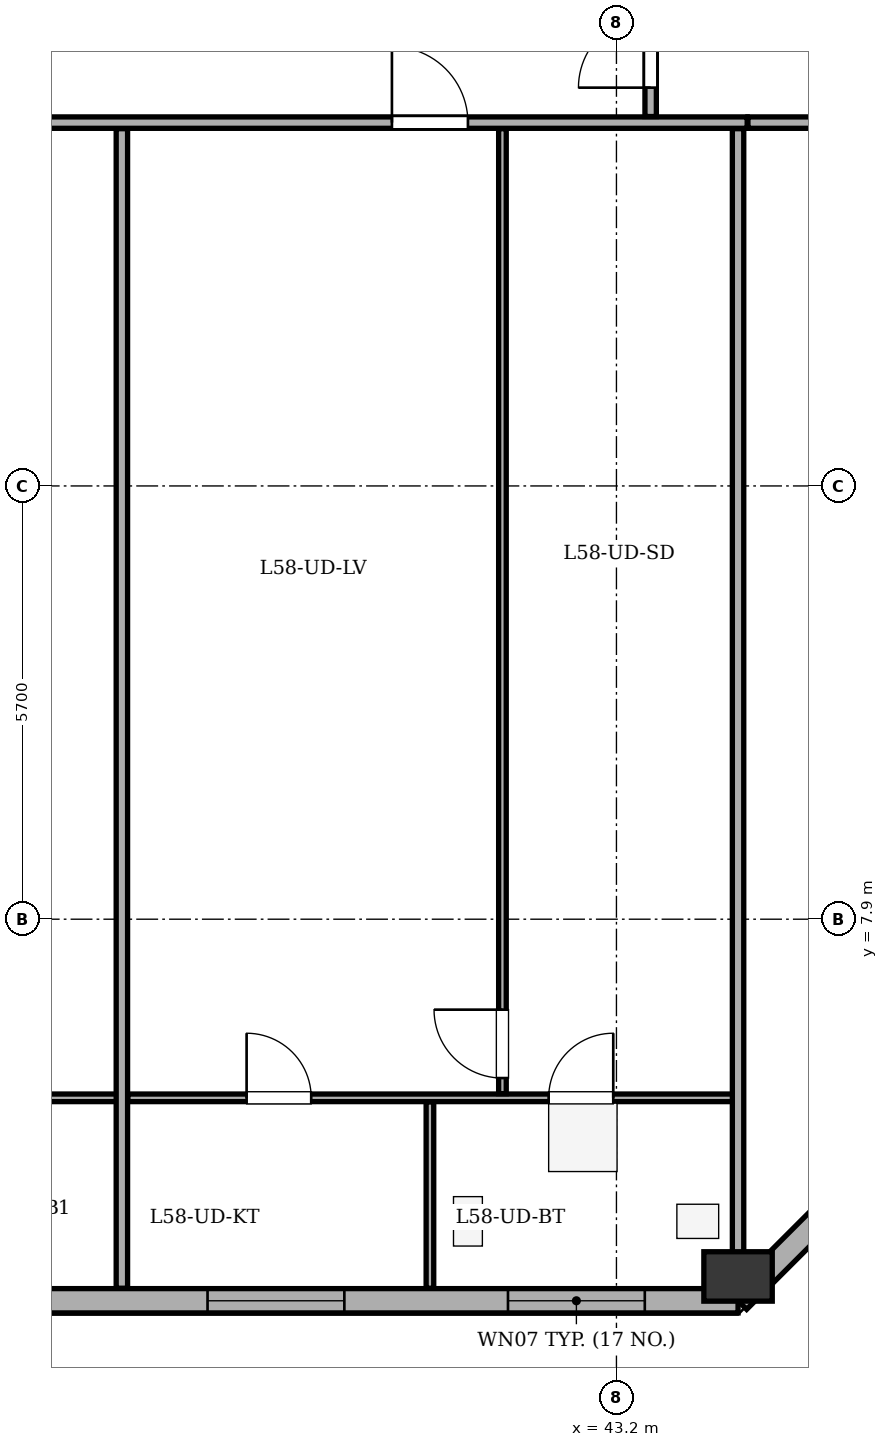
"""IFC4 building model, lengths in metres.
Left out: names, types, materials, properties, quantities, classifications, styles, units other than length and angle.
Written with IfcOpenShell. Run it as: python <this file> out.ifc"""

import sys

from ifc_helpers import new_model, si_unit, direction, frame, frame_2d, origin, origin_2d, place, context, subcontext, project, spatial, rectangle, extrude, element, fill, save


model = new_model("IFC4")
c1 = context("Model", 3, precision=1e-05, world=origin(), true_north=direction((0.0, 1.0)))
c2 = subcontext(c1, "Body", "Model", "MODEL_VIEW")
j1 = project(units=[si_unit("LENGTHUNIT", "METRE"), si_unit("PLANEANGLEUNIT", "RADIAN")], contexts=[c1])
p1 = place(None, origin())
s1 = spatial("IfcSite", under=j1, at=p1, CompositionType="ELEMENT")
p2 = place(p1, origin())
s2 = spatial("IfcBuilding", under=s1, at=p2, CompositionType="ELEMENT")
p3 = place(p2, frame((0.0, 0.0, 224.5)))
s3 = spatial("IfcBuildingStorey", under=s2, at=p3, CompositionType="ELEMENT", Elevation=224.5)
p4 = place(p3, frame((44.8, 3.2, 0.0), z_axis=(0.0, 0.0, 1.0), x_axis=(1.0, 0.0, 0.0)))
e1 = element("IfcColumn", 1, at=p4, inside=s3, PredefinedType="COLUMN", context=c2, shape_type="SweptSolid", body=[
    extrude(rectangle(XDim=0.65, YDim=0.9, at=origin_2d()), origin(), (0.0, 0.0, 1.0), 3.4),
])
p5 = place(p3, frame((44.8, 2.88, 0.0), z_axis=(0.0, 0.0, 1.0), x_axis=(-1.0, 0.0, 0.0)))
e2 = element("IfcWall", 2, at=p5, inside=s3, PredefinedType="STANDARD", context=c2, shape_type="SweptSolid", body=[
    extrude(rectangle(XDim=36.0, YDim=0.32, at=frame_2d((18.0, 0.0))), origin(), (0.0, 0.0, 1.0), 2.335),
])
p6 = place(p5, frame((20.1, 0.0, 0.0)))
e3 = element("IfcOpeningElement", 3, at=p6, cuts=e2, PredefinedType="OPENING", context=c2, shape_type="SweptSolid", body=[
    extrude(rectangle(XDim=1.0, YDim=2.02, at=frame_2d((0.5, 1.01))), frame((0.0, 0.17, 0.0), z_axis=(0.0, -1.0, 0.0), x_axis=(1.0, 0.0, 0.0)), (0.0, 0.0, 1.0), 0.34),
])
p7 = place(p5, frame((1.227, 0.0, 0.75)))
e4 = element("IfcOpeningElement", 4, at=p7, cuts=e2, PredefinedType="OPENING", context=c2, shape_type="SweptSolid", body=[
    extrude(rectangle(XDim=1.8, YDim=1.465, at=frame_2d((0.9, 0.732))), frame((0.0, 0.17, 0.0), z_axis=(0.0, -1.0, 0.0), x_axis=(1.0, 0.0, 0.0)), (0.0, 0.0, 1.0), 0.34),
])
p8 = place(p5, frame((5.18, 0.0, 0.75)))
e5 = element("IfcOpeningElement", 5, at=p8, cuts=e2, PredefinedType="OPENING", context=c2, shape_type="SweptSolid", body=[
    extrude(rectangle(XDim=1.8, YDim=1.465, at=frame_2d((0.9, 0.732))), frame((0.0, 0.17, 0.0), z_axis=(0.0, -1.0, 0.0), x_axis=(1.0, 0.0, 0.0)), (0.0, 0.0, 1.0), 0.34),
])
p9 = place(p5, frame((12.548, 0.0, 0.75)))
e6 = element("IfcOpeningElement", 6, at=p9, cuts=e2, PredefinedType="OPENING", context=c2, shape_type="SweptSolid", body=[
    extrude(rectangle(XDim=1.25, YDim=1.465, at=frame_2d((0.625, 0.732))), frame((0.0, 0.17, 0.0), z_axis=(0.0, -1.0, 0.0), x_axis=(1.0, 0.0, 0.0)), (0.0, 0.0, 1.0), 0.34),
])
p10 = place(p5, frame((26.587, 0.0, 0.75)))
e7 = element("IfcOpeningElement", 7, at=p10, cuts=e2, PredefinedType="OPENING", context=c2, shape_type="SweptSolid", body=[
    extrude(rectangle(XDim=1.8, YDim=1.465, at=frame_2d((0.9, 0.732))), frame((0.0, 0.17, 0.0), z_axis=(0.0, -1.0, 0.0), x_axis=(1.0, 0.0, 0.0)), (0.0, 0.0, 1.0), 0.34),
])
p11 = place(p5, frame((30.94, 0.0, 0.75)))
e8 = element("IfcOpeningElement", 8, at=p11, cuts=e2, PredefinedType="OPENING", context=c2, shape_type="SweptSolid", body=[
    extrude(rectangle(XDim=1.8, YDim=1.465, at=frame_2d((0.9, 0.732))), frame((0.0, 0.17, 0.0), z_axis=(0.0, -1.0, 0.0), x_axis=(1.0, 0.0, 0.0)), (0.0, 0.0, 1.0), 0.34),
])
p12 = place(p5, frame((10.33, 0.0, 0.75)))
e9 = element("IfcOpeningElement", 9, at=p12, cuts=e2, PredefinedType="OPENING", context=c2, shape_type="SweptSolid", body=[
    extrude(rectangle(XDim=0.75, YDim=1.45, at=frame_2d((0.375, 0.725))), frame((0.0, 0.17, 0.0), z_axis=(0.0, -1.0, 0.0), x_axis=(1.0, 0.0, 0.0)), (0.0, 0.0, 1.0), 0.34),
])
p13 = place(p3, frame((49.12, 7.2, 0.0), z_axis=(0.0, 0.0, 1.0), x_axis=(-0.707106781187, -0.707106781187, 0.0)))
e10 = element("IfcWall", 10, at=p13, inside=s3, PredefinedType="STANDARD", context=c2, shape_type="SweptSolid", body=[
    extrude(rectangle(XDim=6.11, YDim=0.32, at=frame_2d((3.055, 0.0))), origin(), (0.0, 0.0, 1.0), 2.335),
])
p14 = place(p13, frame((2.355, 0.0, 0.75)))
e11 = element("IfcOpeningElement", 11, at=p14, cuts=e10, PredefinedType="OPENING", context=c2, shape_type="SweptSolid", body=[
    extrude(rectangle(XDim=1.4, YDim=1.465, at=frame_2d((0.7, 0.732))), frame((0.0, 0.17, 0.0), z_axis=(0.0, -1.0, 0.0), x_axis=(1.0, 0.0, 0.0)), (0.0, 0.0, 1.0), 0.34),
])
p15 = place(p3, frame((10.9, 18.38, 0.0), z_axis=(0.0, 0.0, 1.0), x_axis=(1.0, 0.0, 0.0)))
e12 = element("IfcWall", 12, at=p15, inside=s3, PredefinedType="PARTITIONING", context=c2, shape_type="SweptSolid", body=[
    extrude(rectangle(XDim=34.02, YDim=0.15, at=frame_2d((17.01, 0.0))), origin(), (0.0, 0.0, 1.0), 2.95),
])
p16 = place(p15, frame((2.774, 0.0, 0.0)))
e13 = element("IfcOpeningElement", 13, at=p16, cuts=e12, PredefinedType="OPENING", context=c2, shape_type="SweptSolid", body=[
    extrude(rectangle(XDim=1.0, YDim=2.1, at=frame_2d((0.5, 1.05))), frame((0.0, 0.085, 0.0), z_axis=(0.0, -1.0, 0.0), x_axis=(1.0, 0.0, 0.0)), (0.0, 0.0, 1.0), 0.17),
])
p17 = place(p15, frame((12.118, 0.0, 0.0)))
e14 = element("IfcOpeningElement", 14, at=p17, cuts=e12, PredefinedType="OPENING", context=c2, shape_type="SweptSolid", body=[
    extrude(rectangle(XDim=1.0, YDim=2.1, at=frame_2d((0.5, 1.05))), frame((0.0, 0.085, 0.0), z_axis=(0.0, -1.0, 0.0), x_axis=(1.0, 0.0, 0.0)), (0.0, 0.0, 1.0), 0.17),
])
p18 = place(p15, frame((20.901, 0.0, 0.0)))
e15 = element("IfcOpeningElement", 15, at=p18, cuts=e12, PredefinedType="OPENING", context=c2, shape_type="SweptSolid", body=[
    extrude(rectangle(XDim=1.0, YDim=2.1, at=frame_2d((0.5, 1.05))), frame((0.0, 0.085, 0.0), z_axis=(0.0, -1.0, 0.0), x_axis=(1.0, 0.0, 0.0)), (0.0, 0.0, 1.0), 0.17),
])
p19 = place(p15, frame((29.346, 0.0, 0.0)))
e16 = element("IfcOpeningElement", 16, at=p19, cuts=e12, PredefinedType="OPENING", context=c2, shape_type="SweptSolid", body=[
    extrude(rectangle(XDim=1.0, YDim=2.1, at=frame_2d((0.5, 1.05))), frame((0.0, 0.085, 0.0), z_axis=(0.0, -1.0, 0.0), x_axis=(1.0, 0.0, 0.0)), (0.0, 0.0, 1.0), 0.17),
])
p20 = place(p3, frame((27.99, 5.55, 0.0), z_axis=(0.0, 0.0, 1.0), x_axis=(1.0, 0.0, 0.0)))
e17 = element("IfcWall", 17, at=p20, inside=s3, PredefinedType="PARTITIONING", context=c2, shape_type="SweptSolid", body=[
    extrude(rectangle(XDim=8.743, YDim=0.1, at=frame_2d((4.372, 0.0))), origin(), (0.0, 0.0, 1.0), 2.95),
])
p21 = place(p20, frame((0.625, 0.0, 0.0)))
e18 = element("IfcOpeningElement", 18, at=p21, cuts=e17, PredefinedType="OPENING", context=c2, shape_type="SweptSolid", body=[
    extrude(rectangle(XDim=0.85, YDim=2.05, at=frame_2d((0.425, 1.025))), frame((0.0, 0.06, 0.0), z_axis=(0.0, -1.0, 0.0), x_axis=(1.0, 0.0, 0.0)), (0.0, 0.0, 1.0), 0.12),
])
p22 = place(p20, frame((3.212, 0.0, 0.0)))
e19 = element("IfcOpeningElement", 19, at=p22, cuts=e17, PredefinedType="OPENING", context=c2, shape_type="SweptSolid", body=[
    extrude(rectangle(XDim=0.85, YDim=2.05, at=frame_2d((0.425, 1.025))), frame((0.0, 0.06, 0.0), z_axis=(0.0, -1.0, 0.0), x_axis=(1.0, 0.0, 0.0)), (0.0, 0.0, 1.0), 0.12),
])
p23 = place(p20, frame((6.049, 0.0, 0.0)))
e20 = element("IfcOpeningElement", 20, at=p23, cuts=e17, PredefinedType="OPENING", context=c2, shape_type="SweptSolid", body=[
    extrude(rectangle(XDim=0.9, YDim=2.05, at=frame_2d((0.45, 1.025))), frame((0.0, 0.06, 0.0), z_axis=(0.0, -1.0, 0.0), x_axis=(1.0, 0.0, 0.0)), (0.0, 0.0, 1.0), 0.12),
])
p24 = place(p3, frame((36.693, 3.045, 0.0), z_axis=(0.0, 0.0, 1.0), x_axis=(0.0, 1.0, 0.0)))
e21 = element("IfcWall", 21, at=p24, inside=s3, PredefinedType="PARTITIONING", context=c2, shape_type="SweptSolid", body=[
    extrude(rectangle(XDim=15.255, YDim=0.15, at=frame_2d((7.627, 0.0))), origin(), (0.0, 0.0, 1.0), 2.385),
])
p25 = place(p3, frame((36.773, 5.55, 0.0), z_axis=(0.0, 0.0, 1.0), x_axis=(1.0, 0.0, 0.0)))
e22 = element("IfcWall", 22, at=p25, inside=s3, PredefinedType="PARTITIONING", context=c2, shape_type="SweptSolid", body=[
    extrude(rectangle(XDim=8.067, YDim=0.1, at=frame_2d((4.034, 0.0))), origin(), (0.0, 0.0, 1.0), 2.95),
])
p26 = place(p25, frame((1.561, 0.0, 0.0)))
e23 = element("IfcOpeningElement", 23, at=p26, cuts=e22, PredefinedType="OPENING", context=c2, shape_type="SweptSolid", body=[
    extrude(rectangle(XDim=0.85, YDim=2.05, at=frame_2d((0.425, 1.025))), frame((0.0, 0.06, 0.0), z_axis=(0.0, -1.0, 0.0), x_axis=(1.0, 0.0, 0.0)), (0.0, 0.0, 1.0), 0.12),
])
p27 = place(p25, frame((5.535, 0.0, 0.0)))
e24 = element("IfcOpeningElement", 24, at=p27, cuts=e22, PredefinedType="OPENING", context=c2, shape_type="SweptSolid", body=[
    extrude(rectangle(XDim=0.85, YDim=2.05, at=frame_2d((0.425, 1.025))), frame((0.0, 0.06, 0.0), z_axis=(0.0, -1.0, 0.0), x_axis=(1.0, 0.0, 0.0)), (0.0, 0.0, 1.0), 0.12),
])
p28 = place(p3, frame((41.7, 5.605, 0.0), z_axis=(0.0, 0.0, 1.0), x_axis=(0.0, 1.0, 0.0)))
e25 = element("IfcWall", 25, at=p28, inside=s3, PredefinedType="PARTITIONING", context=c2, shape_type="SweptSolid", body=[
    extrude(rectangle(XDim=12.695, YDim=0.1, at=frame_2d((6.348, 0.0))), origin(), (0.0, 0.0, 1.0), 2.95),
])
p29 = place(p28, frame((0.205, 0.0, 0.0)))
e26 = element("IfcOpeningElement", 26, at=p29, cuts=e25, PredefinedType="OPENING", context=c2, shape_type="SweptSolid", body=[
    extrude(rectangle(XDim=0.9, YDim=2.05, at=frame_2d((0.45, 1.025))), frame((0.0, 0.06, 0.0), z_axis=(0.0, -1.0, 0.0), x_axis=(1.0, 0.0, 0.0)), (0.0, 0.0, 1.0), 0.12),
])
p30 = place(p3, frame((40.746, 3.045, 0.0), z_axis=(0.0, 0.0, 1.0), x_axis=(0.0, 1.0, 0.0)))
e27 = element("IfcWall", 27, at=p30, inside=s3, PredefinedType="PARTITIONING", context=c2, shape_type="SweptSolid", body=[
    extrude(rectangle(XDim=2.45, YDim=0.1, at=frame_2d((1.225, 0.0))), origin(), (0.0, 0.0, 1.0), 2.95),
])
p31 = place(p3, frame((44.8, 3.045, 0.0), z_axis=(0.0, 0.0, 1.0), x_axis=(0.0, 1.0, 0.0)))
e28 = element("IfcWall", 28, at=p31, inside=s3, PredefinedType="PARTITIONING", context=c2, shape_type="SweptSolid", body=[
    extrude(rectangle(XDim=15.255, YDim=0.15, at=frame_2d((7.627, 0.0))), origin(), (0.0, 0.0, 1.0), 2.385),
])
p32 = place(p3, frame((44.93, 18.38, 0.0), z_axis=(0.0, 0.0, 1.0), x_axis=(1.0, 0.0, 0.0)))
e29 = element("IfcWall", 29, at=p32, inside=s3, PredefinedType="PARTITIONING", context=c2, shape_type="SweptSolid", body=[
    extrude(rectangle(XDim=4.025, YDim=0.15, at=frame_2d((2.013, 0.0))), origin(), (0.0, 0.0, 1.0), 2.95),
])
p33 = place(p3, frame((43.65, 18.46, 0.0), z_axis=(0.0, 0.0, 1.0), x_axis=(0.0, 1.0, 0.0)))
e30 = element("IfcWall", 30, at=p33, inside=s3, PredefinedType="PARTITIONING", context=c2, shape_type="SweptSolid", body=[
    extrude(rectangle(XDim=1.79, YDim=0.15, at=frame_2d((0.895, 0.0))), origin(), (0.0, 0.0, 1.0), 2.95),
])
p34 = place(p33, frame((0.38, 0.0, 0.0)))
e31 = element("IfcOpeningElement", 31, at=p34, cuts=e30, PredefinedType="OPENING", context=c2, shape_type="SweptSolid", body=[
    extrude(rectangle(XDim=0.95, YDim=2.1, at=frame_2d((0.475, 1.05))), frame((0.0, 0.085, 0.0), z_axis=(0.0, -1.0, 0.0), x_axis=(1.0, 0.0, 0.0)), (0.0, 0.0, 1.0), 0.17),
])
p35 = place(p7, origin())
e32 = element("IfcWindow", 32, at=p35, inside=s3, PartitioningType="SINGLE_PANEL", PredefinedType="WINDOW", context=c2, shape_type="SweptSolid", body=[
    extrude(rectangle(XDim=1.8, YDim=1.465, at=frame_2d((0.9, 0.732))), frame((0.0, -0.01, 0.0), z_axis=(0.0, -1.0, 0.0), x_axis=(1.0, 0.0, 0.0)), (0.0, 0.0, 1.0), 0.06),
])
fill(e4, e32)
p36 = place(p8, origin())
e33 = element("IfcWindow", 33, at=p36, inside=s3, PartitioningType="SINGLE_PANEL", PredefinedType="WINDOW", context=c2, shape_type="SweptSolid", body=[
    extrude(rectangle(XDim=1.8, YDim=1.465, at=frame_2d((0.9, 0.732))), frame((0.0, -0.01, 0.0), z_axis=(0.0, -1.0, 0.0), x_axis=(1.0, 0.0, 0.0)), (0.0, 0.0, 1.0), 0.06),
])
fill(e5, e33)
p37 = place(p19, origin())
e34 = element("IfcDoor", 34, at=p37, inside=s3, OperationType="SINGLE_SWING_LEFT", PredefinedType="DOOR", context=c2, shape_type="SweptSolid", body=[
    extrude(rectangle(XDim=1.0, YDim=2.1, at=frame_2d((0.5, 1.05))), frame((0.0, 0.025, 0.0), z_axis=(0.0, -1.0, 0.0), x_axis=(1.0, 0.0, 0.0)), (0.0, 0.0, 1.0), 0.05),
])
fill(e16, e34)
p38 = place(p29, origin())
e35 = element("IfcDoor", 35, at=p38, inside=s3, OperationType="SINGLE_SWING_RIGHT", PredefinedType="DOOR", context=c2, shape_type="SweptSolid", body=[
    extrude(rectangle(XDim=0.9, YDim=2.05, at=frame_2d((0.45, 1.025))), frame((0.0, 0.025, 0.0), z_axis=(0.0, -1.0, 0.0), x_axis=(1.0, 0.0, 0.0)), (0.0, 0.0, 1.0), 0.05),
])
fill(e26, e35)
p39 = place(p26, origin())
e36 = element("IfcDoor", 36, at=p39, inside=s3, OperationType="SINGLE_SWING_LEFT", PredefinedType="DOOR", context=c2, shape_type="SweptSolid", body=[
    extrude(rectangle(XDim=0.85, YDim=2.05, at=frame_2d((0.425, 1.025))), frame((0.0, 0.025, 0.0), z_axis=(0.0, -1.0, 0.0), x_axis=(1.0, 0.0, 0.0)), (0.0, 0.0, 1.0), 0.05),
])
fill(e23, e36)
p40 = place(p27, origin())
e37 = element("IfcDoor", 37, at=p40, inside=s3, OperationType="SINGLE_SWING_RIGHT", PredefinedType="DOOR", context=c2, shape_type="SweptSolid", body=[
    extrude(rectangle(XDim=0.85, YDim=2.05, at=frame_2d((0.425, 1.025))), frame((0.0, 0.025, 0.0), z_axis=(0.0, -1.0, 0.0), x_axis=(1.0, 0.0, 0.0)), (0.0, 0.0, 1.0), 0.05),
])
fill(e24, e37)
p41 = place(p34, origin())
e38 = element("IfcDoor", 38, at=p41, inside=s3, OperationType="SINGLE_SWING_LEFT", PredefinedType="DOOR", context=c2, shape_type="SweptSolid", body=[
    extrude(rectangle(XDim=0.95, YDim=2.1, at=frame_2d((0.475, 1.05))), frame((0.0, 0.025, 0.0), z_axis=(0.0, -1.0, 0.0), x_axis=(1.0, 0.0, 0.0)), (0.0, 0.0, 1.0), 0.05),
])
fill(e31, e38)
save(model, sys.argv[1])
